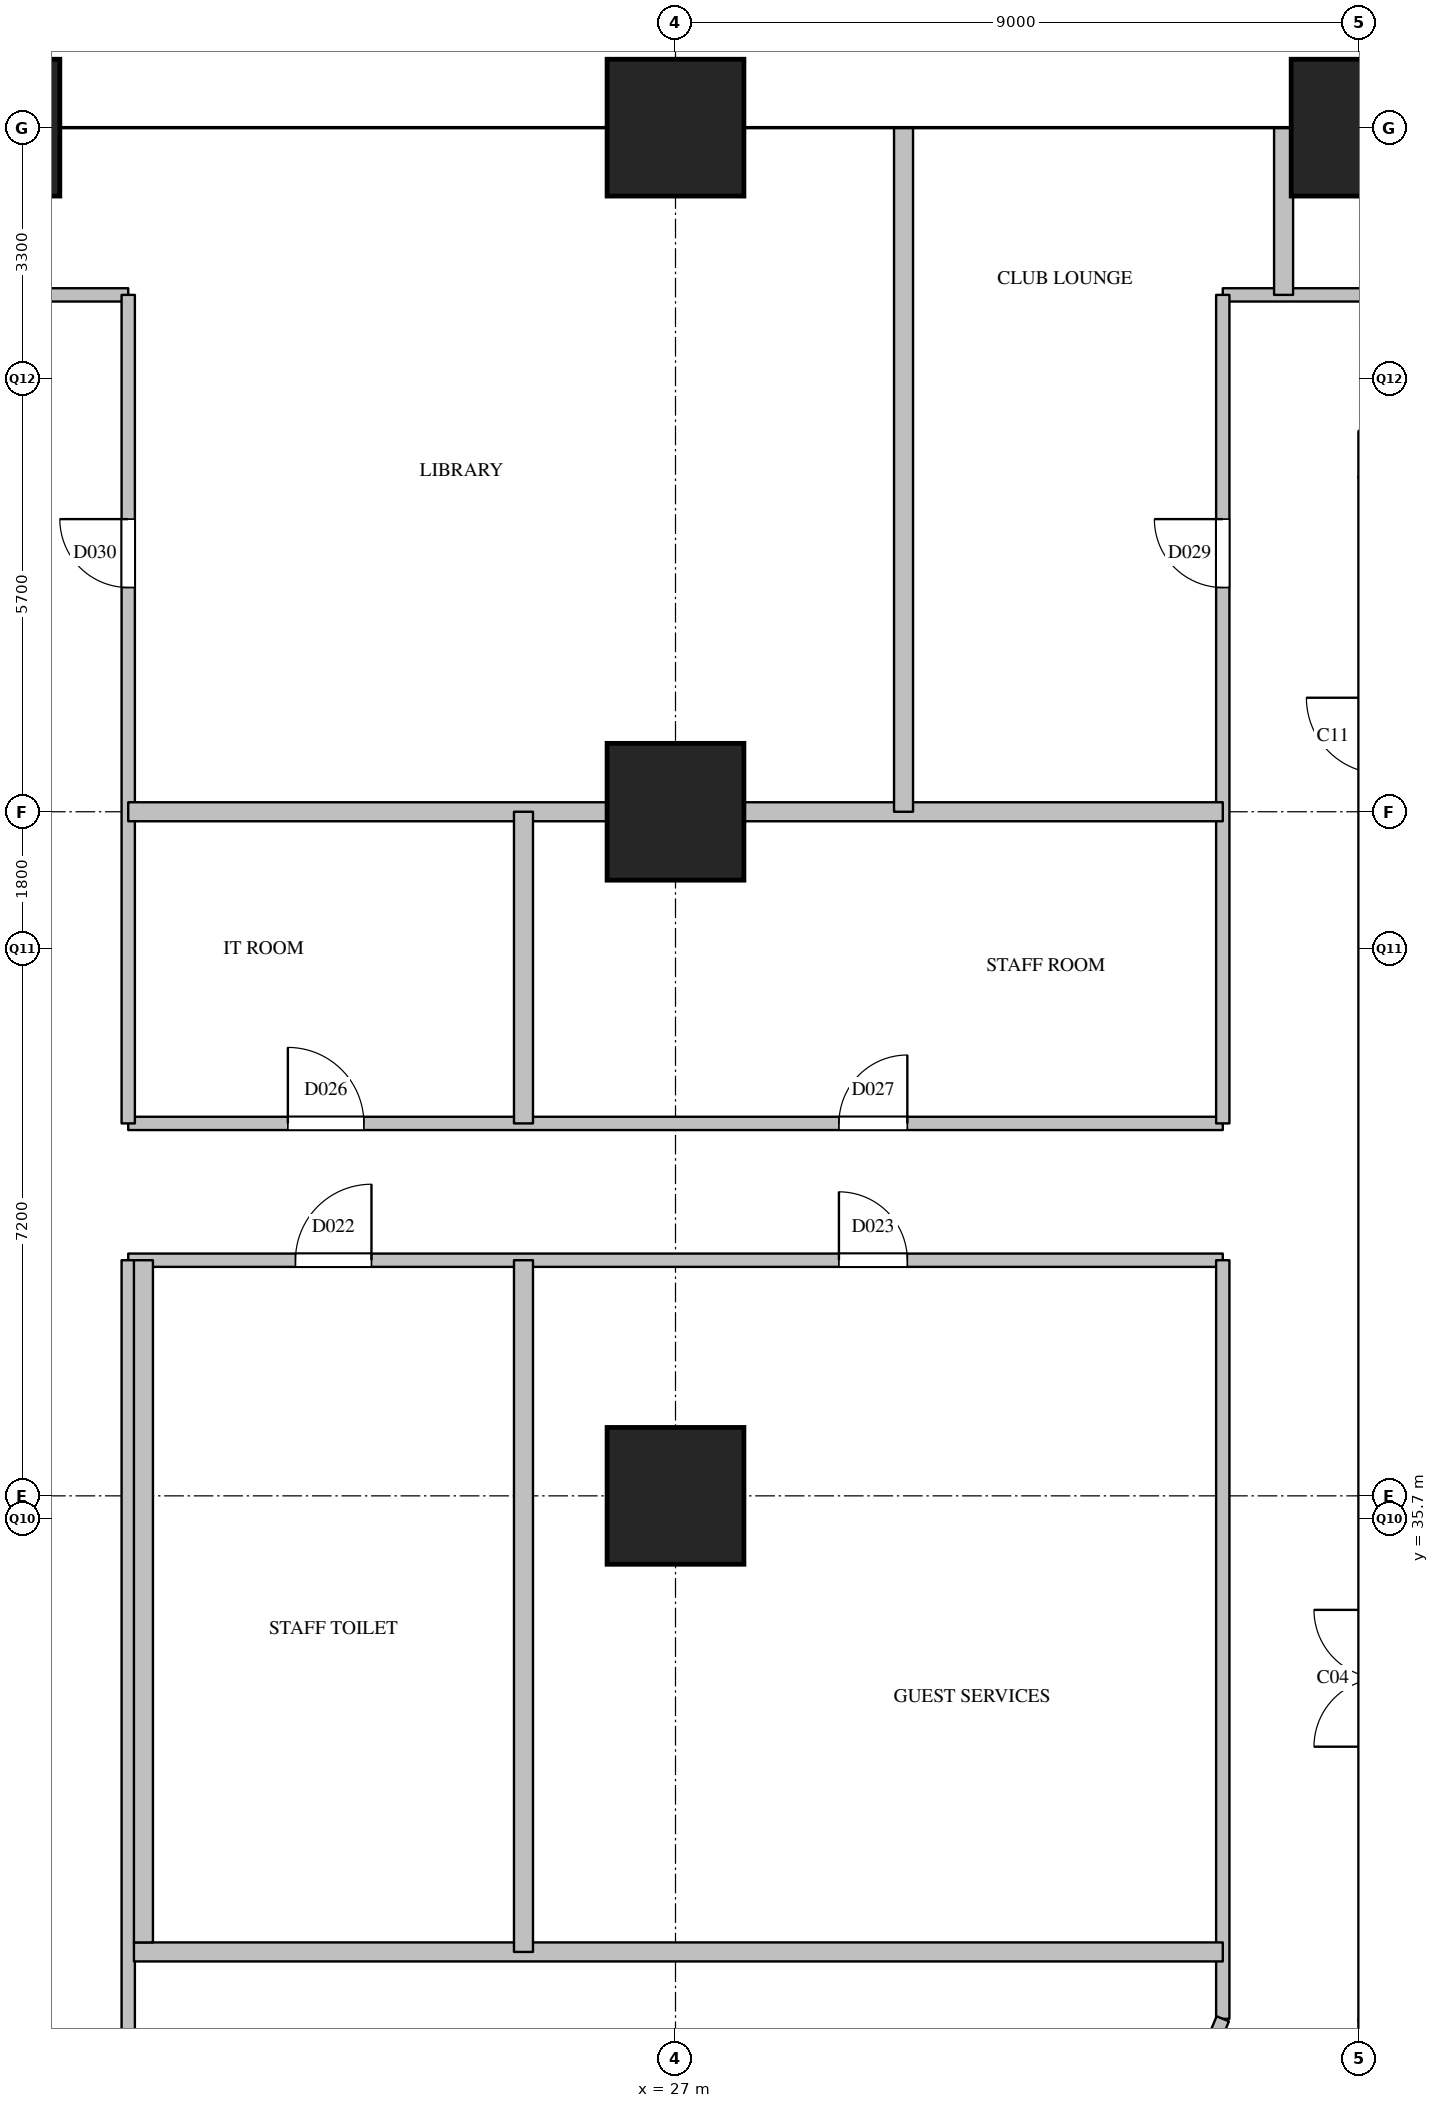
"""IFC4 building model, lengths in metres.
Left out: names, types, materials, properties, quantities, classifications, styles, units other than length and angle.
Written with IfcOpenShell. Run it as: python <this file> out.ifc"""

import sys

from ifc_helpers import new_model, si_unit, direction, frame, frame_2d, origin, origin_2d, place, context, subcontext, project, spatial, rectangle, extrude, element, fill, save


model = new_model("IFC4")
c1 = context("Model", 3, precision=1e-05, world=origin(), true_north=direction((0.0, 1.0)))
c2 = subcontext(c1, "Body", "Model", "MODEL_VIEW")
j1 = project(units=[si_unit("LENGTHUNIT", "METRE"), si_unit("PLANEANGLEUNIT", "RADIAN")], contexts=[c1])
p1 = place(None, origin())
s1 = spatial("IfcSite", under=j1, at=p1, CompositionType="ELEMENT")
p2 = place(p1, origin())
s2 = spatial("IfcBuilding", under=s1, at=p2, CompositionType="ELEMENT")
p3 = place(p2, frame((0.0, 0.0, 119.6)))
s3 = spatial("IfcBuildingStorey", under=s2, at=p3, CompositionType="ELEMENT", Elevation=119.6)
for number, where, z_axis, x_axis in (
    (1, (18.0, 54.0, 0.0), (0.0, 0.0, 1.0), (1.0, 0.0, 0.0)),
    (2, (27.0, 36.0, 0.0), (0.0, 0.0, 1.0), (1.0, 0.0, 0.0)),
    (3, (27.0, 45.0, 0.0), (0.0, 0.0, 1.0), (1.0, 0.0, 0.0)),
    (4, (27.0, 54.0, 0.0), (0.0, 0.0, 1.0), (1.0, 0.0, 0.0)),
    (5, (36.0, 54.0, 0.0), (0.0, 0.0, 1.0), (1.0, 0.0, 0.0)),
):
    element("IfcColumn", number, at=place(p3, frame(where, z_axis=z_axis, x_axis=x_axis)), inside=s3, PredefinedType="COLUMN", context=c2, shape_type="SweptSolid", body=[
        extrude(rectangle(XDim=1.8, YDim=1.8, at=origin_2d()), origin(), (0.0, 0.0, 1.0), 3.8),
    ])
p4 = place(p3, frame((19.8, 39.1, 0.0), z_axis=(0.0, 0.0, 1.0), x_axis=(1.0, 0.0, 0.0)))
e6 = element("IfcWall", 6, at=p4, inside=s3, PredefinedType="PARTITIONING", context=c2, shape_type="SweptSolid", body=[
    extrude(rectangle(XDim=14.4, YDim=0.175, at=frame_2d((7.2, 0.0))), origin(), (0.0, 0.0, 1.0), 2.3),
])
p5 = place(p4, frame((2.2, 0.0, 0.0)))
e7 = element("IfcOpeningElement", 7, at=p5, cuts=e6, PredefinedType="OPENING", context=c2, shape_type="SweptSolid", body=[
    extrude(rectangle(XDim=1.0, YDim=2.1, at=frame_2d((0.5, 1.05))), frame((0.0, 0.097, 0.0), z_axis=(0.0, -1.0, 0.0), x_axis=(1.0, 0.0, 0.0)), (0.0, 0.0, 1.0), 0.195),
])
p6 = place(p4, frame((9.35, 0.0, 0.0)))
e8 = element("IfcOpeningElement", 8, at=p6, cuts=e6, PredefinedType="OPENING", context=c2, shape_type="SweptSolid", body=[
    extrude(rectangle(XDim=0.9, YDim=2.1, at=frame_2d((0.45, 1.05))), frame((0.0, 0.097, 0.0), z_axis=(0.0, -1.0, 0.0), x_axis=(1.0, 0.0, 0.0)), (0.0, 0.0, 1.0), 0.195),
])
p7 = place(p3, frame((19.8, 40.9, 0.0), z_axis=(0.0, 0.0, 1.0), x_axis=(1.0, 0.0, 0.0)))
e9 = element("IfcWall", 9, at=p7, inside=s3, PredefinedType="PARTITIONING", context=c2, shape_type="SweptSolid", body=[
    extrude(rectangle(XDim=14.4, YDim=0.175, at=frame_2d((7.2, 0.0))), origin(), (0.0, 0.0, 1.0), 2.3),
])
p8 = place(p7, frame((2.1, 0.0, 0.0)))
e10 = element("IfcOpeningElement", 10, at=p8, cuts=e9, PredefinedType="OPENING", context=c2, shape_type="SweptSolid", body=[
    extrude(rectangle(XDim=1.0, YDim=2.1, at=frame_2d((0.5, 1.05))), frame((0.0, 0.097, 0.0), z_axis=(0.0, -1.0, 0.0), x_axis=(1.0, 0.0, 0.0)), (0.0, 0.0, 1.0), 0.195),
])
p9 = place(p7, frame((9.35, 0.0, 0.0)))
e11 = element("IfcOpeningElement", 11, at=p9, cuts=e9, PredefinedType="OPENING", context=c2, shape_type="SweptSolid", body=[
    extrude(rectangle(XDim=0.9, YDim=2.1, at=frame_2d((0.45, 1.05))), frame((0.0, 0.097, 0.0), z_axis=(0.0, -1.0, 0.0), x_axis=(1.0, 0.0, 0.0)), (0.0, 0.0, 1.0), 0.195),
])
p10 = place(p3, frame((3.8, 51.8, 0.0), z_axis=(0.0, 0.0, 1.0), x_axis=(1.0, 0.0, 0.0)))
e12 = element("IfcWall", 12, at=p10, inside=s3, PredefinedType="PARTITIONING", context=c2, shape_type="SweptSolid", body=[
    extrude(rectangle(XDim=16.0, YDim=0.175, at=frame_2d((8.0, 0.0))), origin(), (0.0, 0.0, 1.0), 3.3),
])
p11 = place(p10, frame((7.587, 0.0, 0.0)))
e13 = element("IfcOpeningElement", 13, at=p11, cuts=e12, PredefinedType="OPENING", context=c2, shape_type="SweptSolid", body=[
    extrude(rectangle(XDim=0.9, YDim=2.1, at=frame_2d((0.45, 1.05))), frame((0.0, 0.097, 0.0), z_axis=(0.0, -1.0, 0.0), x_axis=(1.0, 0.0, 0.0)), (0.0, 0.0, 1.0), 0.195),
])
p12 = place(p3, frame((34.2, 51.8, 0.0), z_axis=(0.0, 0.0, 1.0), x_axis=(1.0, 0.0, 0.0)))
e14 = element("IfcWall", 14, at=p12, inside=s3, PredefinedType="PARTITIONING", context=c2, shape_type="SweptSolid", body=[
    extrude(rectangle(XDim=16.0, YDim=0.175, at=frame_2d((8.0, 0.0))), origin(), (0.0, 0.0, 1.0), 3.3),
])
p13 = place(p12, frame((5.35, 0.0, 0.0)))
e15 = element("IfcOpeningElement", 15, at=p13, cuts=e14, PredefinedType="OPENING", context=c2, shape_type="SweptSolid", body=[
    extrude(rectangle(XDim=0.9, YDim=2.1, at=frame_2d((0.45, 1.05))), frame((0.0, 0.097, 0.0), z_axis=(0.0, -1.0, 0.0), x_axis=(1.0, 0.0, 0.0)), (0.0, 0.0, 1.0), 0.195),
])
p14 = place(p3, frame((19.8, 28.5, 0.0), z_axis=(0.0, 0.0, 1.0), x_axis=(0.0, 1.0, 0.0)))
e16 = element("IfcWall", 16, at=p14, inside=s3, PredefinedType="PARTITIONING", context=c2, shape_type="SweptSolid", body=[
    extrude(rectangle(XDim=10.6, YDim=0.175, at=frame_2d((5.3, 0.0))), origin(), (0.0, 0.0, 1.0), 3.3),
])
p15 = place(p3, frame((19.8, 40.9, 0.0), z_axis=(0.0, 0.0, 1.0), x_axis=(0.0, 1.0, 0.0)))
e17 = element("IfcWall", 17, at=p15, inside=s3, PredefinedType="PARTITIONING", context=c2, shape_type="SweptSolid", body=[
    extrude(rectangle(XDim=10.9, YDim=0.175, at=frame_2d((5.45, 0.0))), origin(), (0.0, 0.0, 1.0), 3.3),
])
p16 = place(p15, frame((7.05, 0.0, 0.0)))
e18 = element("IfcOpeningElement", 18, at=p16, cuts=e17, PredefinedType="OPENING", context=c2, shape_type="SweptSolid", body=[
    extrude(rectangle(XDim=0.9, YDim=2.1, at=frame_2d((0.45, 1.05))), frame((0.0, 0.097, 0.0), z_axis=(0.0, -1.0, 0.0), x_axis=(1.0, 0.0, 0.0)), (0.0, 0.0, 1.0), 0.195),
])
p17 = place(p3, frame((34.2, 29.12, 0.0), z_axis=(0.0, 0.0, 1.0), x_axis=(0.0, 1.0, 0.0)))
e19 = element("IfcWall", 19, at=p17, inside=s3, PredefinedType="PARTITIONING", context=c2, shape_type="SweptSolid", body=[
    extrude(rectangle(XDim=9.98, YDim=0.175, at=frame_2d((4.99, 0.0))), origin(), (0.0, 0.0, 1.0), 3.3),
])
p18 = place(p3, frame((34.2, 40.9, 0.0), z_axis=(0.0, 0.0, 1.0), x_axis=(0.0, 1.0, 0.0)))
e20 = element("IfcWall", 20, at=p18, inside=s3, PredefinedType="PARTITIONING", context=c2, shape_type="SweptSolid", body=[
    extrude(rectangle(XDim=10.9, YDim=0.175, at=frame_2d((5.45, 0.0))), origin(), (0.0, 0.0, 1.0), 3.3),
])
p19 = place(p18, frame((7.05, 0.0, 0.0)))
e21 = element("IfcOpeningElement", 21, at=p19, cuts=e20, PredefinedType="OPENING", context=c2, shape_type="SweptSolid", body=[
    extrude(rectangle(XDim=0.9, YDim=2.1, at=frame_2d((0.45, 1.05))), frame((0.0, 0.097, 0.0), z_axis=(0.0, -1.0, 0.0), x_axis=(1.0, 0.0, 0.0)), (0.0, 0.0, 1.0), 0.195),
])
p20 = place(p3, frame((19.875, 30.0, 0.0), z_axis=(0.0, 0.0, 1.0), x_axis=(1.0, 0.0, 0.0)))
e22 = element("IfcWall", 22, at=p20, inside=s3, PredefinedType="PARTITIONING", context=c2, shape_type="SweptSolid", body=[
    extrude(rectangle(XDim=14.325, YDim=0.25, at=frame_2d((7.163, 0.0))), origin(), (0.0, 0.0, 1.0), 2.3),
])
p21 = place(p3, frame((19.8, 45.0, 0.0), z_axis=(0.0, 0.0, 1.0), x_axis=(1.0, 0.0, 0.0)))
e23 = element("IfcWall", 23, at=p21, inside=s3, PredefinedType="PARTITIONING", context=c2, shape_type="SweptSolid", body=[
    extrude(rectangle(XDim=14.4, YDim=0.25, at=frame_2d((7.2, 0.0))), origin(), (0.0, 0.0, 1.0), 3.3),
])
p22 = place(p3, frame((20.0, 30.125, 0.0), z_axis=(0.0, 0.0, 1.0), x_axis=(0.0, 1.0, 0.0)))
e24 = element("IfcWall", 24, at=p22, inside=s3, PredefinedType="PARTITIONING", context=c2, shape_type="SweptSolid", body=[
    extrude(rectangle(XDim=8.975, YDim=0.25, at=frame_2d((4.488, 0.0))), origin(), (0.0, 0.0, 1.0), 3.3),
])
p23 = place(p3, frame((25.0, 30.0, 0.0), z_axis=(0.0, 0.0, 1.0), x_axis=(0.0, 1.0, 0.0)))
e25 = element("IfcWall", 25, at=p23, inside=s3, PredefinedType="PARTITIONING", context=c2, shape_type="SweptSolid", body=[
    extrude(rectangle(XDim=9.1, YDim=0.25, at=frame_2d((4.55, 0.0))), origin(), (0.0, 0.0, 1.0), 3.3),
])
p24 = place(p3, frame((25.0, 40.9, 0.0), z_axis=(0.0, 0.0, 1.0), x_axis=(0.0, 1.0, 0.0)))
e26 = element("IfcWall", 26, at=p24, inside=s3, PredefinedType="PARTITIONING", context=c2, shape_type="SweptSolid", body=[
    extrude(rectangle(XDim=4.1, YDim=0.25, at=frame_2d((2.05, 0.0))), origin(), (0.0, 0.0, 1.0), 3.3),
])
p25 = place(p3, frame((30.0, 45.0, 0.0), z_axis=(0.0, 0.0, 1.0), x_axis=(0.0, 1.0, 0.0)))
e27 = element("IfcWall", 27, at=p25, inside=s3, PredefinedType="PARTITIONING", context=c2, shape_type="SweptSolid", body=[
    extrude(rectangle(XDim=9.0, YDim=0.25, at=frame_2d((4.5, 0.0))), origin(), (0.0, 0.0, 1.0), 2.3),
])
p26 = place(p3, frame((35.0, 51.8, 0.0), z_axis=(0.0, 0.0, 1.0), x_axis=(0.0, 1.0, 0.0)))
e28 = element("IfcWall", 28, at=p26, inside=s3, PredefinedType="PARTITIONING", context=c2, shape_type="SweptSolid", body=[
    extrude(rectangle(XDim=2.2, YDim=0.25, at=frame_2d((1.1, 0.0))), origin(), (0.0, 0.0, 1.0), 2.3),
])
p27 = place(p3, frame((33.7, 27.92, 0.0), z_axis=(0.0, 0.0, 1.0), x_axis=(0.384562051588, 0.923099143363, 0.0)))
e29 = element("IfcWall", 29, at=p27, inside=s3, PredefinedType="PARTITIONING", context=c2, shape_type="SweptSolid", body=[
    extrude(rectangle(XDim=1.3, YDim=0.175, at=frame_2d((0.65, 0.0))), origin(), (0.0, 0.0, 1.0), 3.3),
])
p28 = place(p5, origin())
e30 = element("IfcDoor", 30, at=p28, inside=s3, OperationType="SINGLE_SWING_RIGHT", PredefinedType="DOOR", context=c2, shape_type="SweptSolid", body=[
    extrude(rectangle(XDim=1.0, YDim=2.1, at=frame_2d((0.5, 1.05))), frame((0.0, 0.025, 0.0), z_axis=(0.0, -1.0, 0.0), x_axis=(1.0, 0.0, 0.0)), (0.0, 0.0, 1.0), 0.05),
])
fill(e7, e30)
p29 = place(p6, origin())
e31 = element("IfcDoor", 31, at=p29, inside=s3, OperationType="SINGLE_SWING_LEFT", PredefinedType="DOOR", context=c2, shape_type="SweptSolid", body=[
    extrude(rectangle(XDim=0.9, YDim=2.1, at=frame_2d((0.45, 1.05))), frame((0.0, 0.025, 0.0), z_axis=(0.0, -1.0, 0.0), x_axis=(1.0, 0.0, 0.0)), (0.0, 0.0, 1.0), 0.05),
])
fill(e8, e31)
p30 = place(p8, origin())
e32 = element("IfcDoor", 32, at=p30, inside=s3, OperationType="SINGLE_SWING_LEFT", PredefinedType="DOOR", context=c2, shape_type="SweptSolid", body=[
    extrude(rectangle(XDim=1.0, YDim=2.1, at=frame_2d((0.5, 1.05))), frame((0.0, 0.025, 0.0), z_axis=(0.0, -1.0, 0.0), x_axis=(1.0, 0.0, 0.0)), (0.0, 0.0, 1.0), 0.05),
])
fill(e10, e32)
p31 = place(p9, origin())
e33 = element("IfcDoor", 33, at=p31, inside=s3, OperationType="SINGLE_SWING_RIGHT", PredefinedType="DOOR", context=c2, shape_type="SweptSolid", body=[
    extrude(rectangle(XDim=0.9, YDim=2.1, at=frame_2d((0.45, 1.05))), frame((0.0, 0.025, 0.0), z_axis=(0.0, -1.0, 0.0), x_axis=(1.0, 0.0, 0.0)), (0.0, 0.0, 1.0), 0.05),
])
fill(e11, e33)
p32 = place(p19, origin())
e34 = element("IfcDoor", 34, at=p32, inside=s3, OperationType="SINGLE_SWING_RIGHT", PredefinedType="DOOR", context=c2, shape_type="SweptSolid", body=[
    extrude(rectangle(XDim=0.9, YDim=2.1, at=frame_2d((0.45, 1.05))), frame((0.0, 0.025, 0.0), z_axis=(0.0, -1.0, 0.0), x_axis=(1.0, 0.0, 0.0)), (0.0, 0.0, 1.0), 0.05),
])
fill(e21, e34)
p33 = place(p16, origin())
e35 = element("IfcDoor", 35, at=p33, inside=s3, OperationType="SINGLE_SWING_RIGHT", PredefinedType="DOOR", context=c2, shape_type="SweptSolid", body=[
    extrude(rectangle(XDim=0.9, YDim=2.1, at=frame_2d((0.45, 1.05))), frame((0.0, 0.025, 0.0), z_axis=(0.0, -1.0, 0.0), x_axis=(1.0, 0.0, 0.0)), (0.0, 0.0, 1.0), 0.05),
])
fill(e18, e35)
save(model, sys.argv[1])
